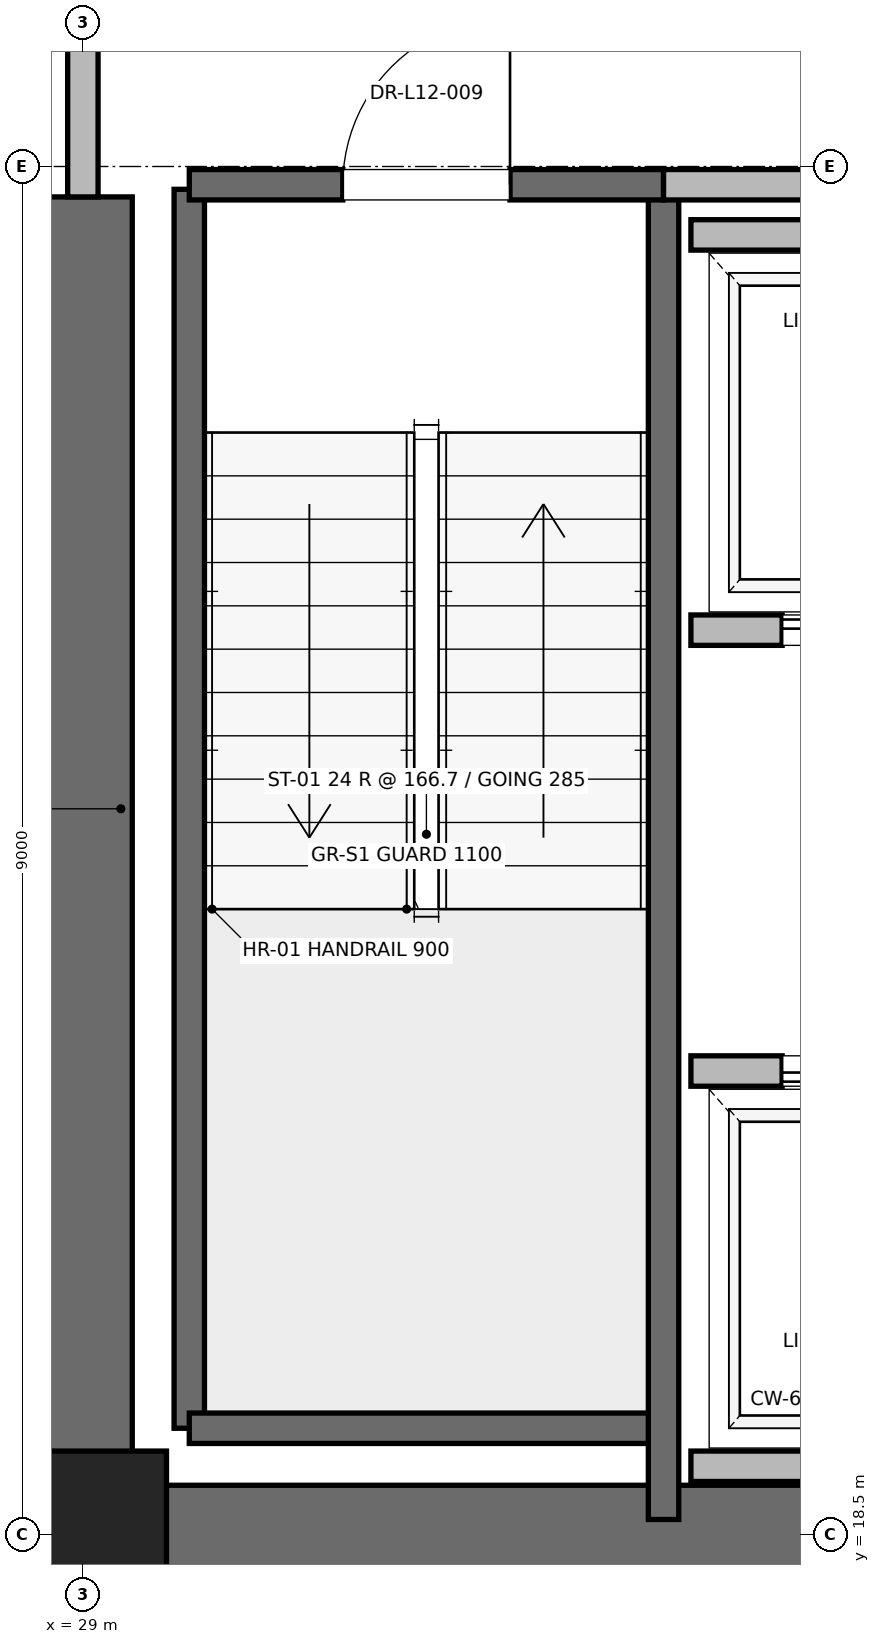
"""IFC4 building model, lengths in metres.
Left out: names, types, materials, properties, quantities, classifications, styles, units other than length and angle.
Written with IfcOpenShell. Run it as: python <this file> out.ifc"""

import sys

from ifc_helpers import new_model, si_unit, direction, frame, frame_2d, origin, origin_2d, place, context, subcontext, project, spatial, rectangle, extrude, element, fill, save


model = new_model("IFC4")
c1 = context("Model", 3, precision=1e-05, world=origin(), true_north=direction((0.0, 1.0)))
c2 = subcontext(c1, "Body", "Model", "MODEL_VIEW")
j1 = project(units=[si_unit("LENGTHUNIT", "METRE"), si_unit("PLANEANGLEUNIT", "RADIAN")], contexts=[c1])
p1 = place(None, origin())
s1 = spatial("IfcSite", under=j1, at=p1, CompositionType="ELEMENT")
p2 = place(p1, origin())
s2 = spatial("IfcBuilding", under=s1, at=p2, CompositionType="ELEMENT")
p3 = place(p2, frame((0.0, 0.0, 55.6)))
s3 = spatial("IfcBuildingStorey", under=s2, at=p3, CompositionType="ELEMENT", Elevation=55.6)
p4 = place(p3, frame((29.0, 18.5, 0.0), z_axis=(0.0, 0.0, 1.0), x_axis=(1.0, 0.0, 0.0)))
e1 = element("IfcColumn", 1, at=p4, inside=s3, PredefinedType="PILASTER", context=c2, shape_type="SweptSolid", body=[
    extrude(rectangle(XDim=1.1, YDim=1.1, at=origin_2d()), origin(), (0.0, 0.0, 1.0), 4.0),
])
p5 = place(p3, frame((29.0, 18.5, 0.0), z_axis=(0.0, 0.0, 1.0), x_axis=(1.0, 0.0, 0.0)))
e2 = element("IfcWall", 2, at=p5, inside=s3, PredefinedType="SHEAR", context=c2, shape_type="SweptSolid", body=[
    extrude(rectangle(XDim=9.2, YDim=0.65, at=frame_2d((4.6, 0.0))), origin(), (0.0, 0.0, 1.0), 3.76),
])
p6 = place(p3, frame((29.0, 18.5, 0.0), z_axis=(0.0, 0.0, 1.0), x_axis=(0.0, 1.0, 0.0)))
e3 = element("IfcWall", 3, at=p6, inside=s3, PredefinedType="SHEAR", context=c2, shape_type="SweptSolid", body=[
    extrude(rectangle(XDim=8.8, YDim=0.65, at=frame_2d((4.4, 0.0))), origin(), (0.0, 0.0, 1.0), 3.76),
])
p7 = place(p3, frame((29.7, 19.2, 0.0), z_axis=(0.0, 0.0, 1.0), x_axis=(0.0, 1.0, 0.0)))
e4 = element("IfcWall", 4, at=p7, inside=s3, PredefinedType="SOLIDWALL", context=c2, shape_type="SweptSolid", body=[
    extrude(rectangle(XDim=8.15, YDim=0.2, at=frame_2d((4.075, 0.0))), origin(), (0.0, 0.0, 1.0), 3.76),
])
p8 = place(p3, frame((29.7, 19.2, 0.0), z_axis=(0.0, 0.0, 1.0), x_axis=(1.0, 0.0, 0.0)))
e5 = element("IfcWall", 5, at=p8, inside=s3, PredefinedType="SOLIDWALL", context=c2, shape_type="SweptSolid", body=[
    extrude(rectangle(XDim=3.12, YDim=0.2, at=frame_2d((1.56, 0.0))), origin(), (0.0, 0.0, 1.0), 3.76),
])
p9 = place(p3, frame((32.82, 18.6, 0.0), z_axis=(0.0, 0.0, 1.0), x_axis=(0.0, 1.0, 0.0)))
e6 = element("IfcWall", 6, at=p9, inside=s3, PredefinedType="SOLIDWALL", context=c2, shape_type="SweptSolid", body=[
    extrude(rectangle(XDim=8.78, YDim=0.2, at=frame_2d((4.39, 0.0))), origin(), (0.0, 0.0, 1.0), 3.76),
])
p10 = place(p3, frame((29.7, 27.38, 0.0), z_axis=(0.0, 0.0, 1.0), x_axis=(1.0, 0.0, 0.0)))
e7 = element("IfcWall", 7, at=p10, inside=s3, PredefinedType="SOLIDWALL", context=c2, shape_type="SweptSolid", body=[
    extrude(rectangle(XDim=3.12, YDim=0.2, at=frame_2d((1.56, 0.0))), origin(), (0.0, 0.0, 1.0), 3.76),
])
p11 = place(p10, frame((1.01, 0.0, 0.0)))
e8 = element("IfcOpeningElement", 8, at=p11, cuts=e7, PredefinedType="OPENING", context=c2, shape_type="SweptSolid", body=[
    extrude(rectangle(XDim=1.1, YDim=2.15, at=frame_2d((0.55, 1.075))), frame((0.0, 0.1, 0.0), z_axis=(0.0, -1.0, 0.0), x_axis=(1.0, 0.0, 0.0)), (0.0, 0.0, 1.0), 0.2),
])
p12 = place(p3, frame((29.0, 27.3, 0.0), z_axis=(0.0, 0.0, 1.0), x_axis=(0.0, 1.0, 0.0)))
e9 = element("IfcWall", 9, at=p12, inside=s3, PredefinedType="PARTITIONING", context=c2, shape_type="SweptSolid", body=[
    extrude(rectangle(XDim=3.4, YDim=0.2, at=frame_2d((1.7, 0.0))), origin(), (0.0, 0.0, 1.0), 2.54),
])
p13 = place(p12, frame((1.125, 0.0, 0.0)))
e10 = element("IfcOpeningElement", 10, at=p13, cuts=e9, PredefinedType="OPENING", context=c2, shape_type="SweptSolid", body=[
    extrude(rectangle(XDim=1.15, YDim=2.2, at=frame_2d((0.575, 1.1))), frame((0.0, 0.1, 0.0), z_axis=(0.0, -1.0, 0.0), x_axis=(1.0, 0.0, 0.0)), (0.0, 0.0, 1.0), 0.2),
])
p14 = place(p3, frame((32.82, 27.38, 0.0), z_axis=(0.0, 0.0, 1.0), x_axis=(1.0, 0.0, 0.0)))
e11 = element("IfcWall", 11, at=p14, inside=s3, PredefinedType="PARTITIONING", context=c2, shape_type="SweptSolid", body=[
    extrude(rectangle(XDim=5.62, YDim=0.2, at=frame_2d((2.81, 0.0))), origin(), (0.0, 0.0, 1.0), 3.76),
])
p15 = place(p3, frame((33.0, 18.95, 0.0), z_axis=(0.0, 0.0, 1.0), x_axis=(1.0, 0.0, 0.0)))
e12 = element("IfcWall", 12, at=p15, inside=s3, PredefinedType="SOLIDWALL", context=c2, shape_type="SweptSolid", body=[
    extrude(rectangle(XDim=2.3, YDim=0.2, at=frame_2d((1.15, 0.0))), origin(), (0.0, 0.0, 1.0), 3.76),
])
p16 = place(p3, frame((35.3, 21.55, 0.0), z_axis=(0.0, 0.0, 1.0), x_axis=(-1.0, 0.0, 0.0)))
e13 = element("IfcWall", 13, at=p16, inside=s3, PredefinedType="SOLIDWALL", context=c2, shape_type="SweptSolid", body=[
    extrude(rectangle(XDim=2.3, YDim=0.2, at=frame_2d((1.15, 0.0))), origin(), (0.0, 0.0, 1.0), 3.76),
])
p17 = place(p16, frame((0.6, 0.0, 0.0)))
e14 = element("IfcOpeningElement", 14, at=p17, cuts=e13, PredefinedType="OPENING", context=c2, shape_type="SweptSolid", body=[
    extrude(rectangle(XDim=1.1, YDim=2.2, at=frame_2d((0.55, 1.1))), frame((0.0, 0.1, 0.0), z_axis=(0.0, -1.0, 0.0), x_axis=(1.0, 0.0, 0.0)), (0.0, 0.0, 1.0), 0.2),
])
p18 = place(p3, frame((33.0, 24.45, 0.0), z_axis=(0.0, 0.0, 1.0), x_axis=(1.0, 0.0, 0.0)))
e15 = element("IfcWall", 15, at=p18, inside=s3, PredefinedType="SOLIDWALL", context=c2, shape_type="SweptSolid", body=[
    extrude(rectangle(XDim=2.3, YDim=0.2, at=frame_2d((1.15, 0.0))), origin(), (0.0, 0.0, 1.0), 3.76),
])
p19 = place(p18, frame((0.6, 0.0, 0.0)))
e16 = element("IfcOpeningElement", 16, at=p19, cuts=e15, PredefinedType="OPENING", context=c2, shape_type="SweptSolid", body=[
    extrude(rectangle(XDim=1.1, YDim=2.2, at=frame_2d((0.55, 1.1))), frame((0.0, 0.1, 0.0), z_axis=(0.0, -1.0, 0.0), x_axis=(1.0, 0.0, 0.0)), (0.0, 0.0, 1.0), 0.2),
])
p20 = place(p3, frame((35.3, 27.05, 0.0), z_axis=(0.0, 0.0, 1.0), x_axis=(-1.0, 0.0, 0.0)))
e17 = element("IfcWall", 17, at=p20, inside=s3, PredefinedType="SOLIDWALL", context=c2, shape_type="SweptSolid", body=[
    extrude(rectangle(XDim=2.3, YDim=0.2, at=frame_2d((1.15, 0.0))), origin(), (0.0, 0.0, 1.0), 3.76),
])
p21 = place(p11, origin())
e18 = element("IfcDoor", 18, at=p21, inside=s3, OperationType="SINGLE_SWING_RIGHT", PredefinedType="DOOR", context=c2, shape_type="SweptSolid", body=[
    extrude(rectangle(XDim=1.1, YDim=2.15, at=frame_2d((0.55, 1.075))), frame((0.0, 0.025, 0.0), z_axis=(0.0, -1.0, 0.0), x_axis=(1.0, 0.0, 0.0)), (0.0, 0.0, 1.0), 0.05),
])
fill(e8, e18)
p22 = place(p17, origin())
e19 = element("IfcDoor", 19, at=p22, inside=s3, OperationType="SLIDING_TO_RIGHT", PredefinedType="DOOR", context=c2, shape_type="SweptSolid", body=[
    extrude(rectangle(XDim=1.1, YDim=2.2, at=frame_2d((0.55, 1.1))), frame((0.0, 0.025, 0.0), z_axis=(0.0, -1.0, 0.0), x_axis=(1.0, 0.0, 0.0)), (0.0, 0.0, 1.0), 0.05),
])
fill(e14, e19)
p23 = place(p19, origin())
e20 = element("IfcDoor", 20, at=p23, inside=s3, OperationType="SLIDING_TO_RIGHT", PredefinedType="DOOR", context=c2, shape_type="SweptSolid", body=[
    extrude(rectangle(XDim=1.1, YDim=2.2, at=frame_2d((0.55, 1.1))), frame((0.0, 0.025, 0.0), z_axis=(0.0, -1.0, 0.0), x_axis=(1.0, 0.0, 0.0)), (0.0, 0.0, 1.0), 0.05),
])
fill(e16, e20)
save(model, sys.argv[1])
